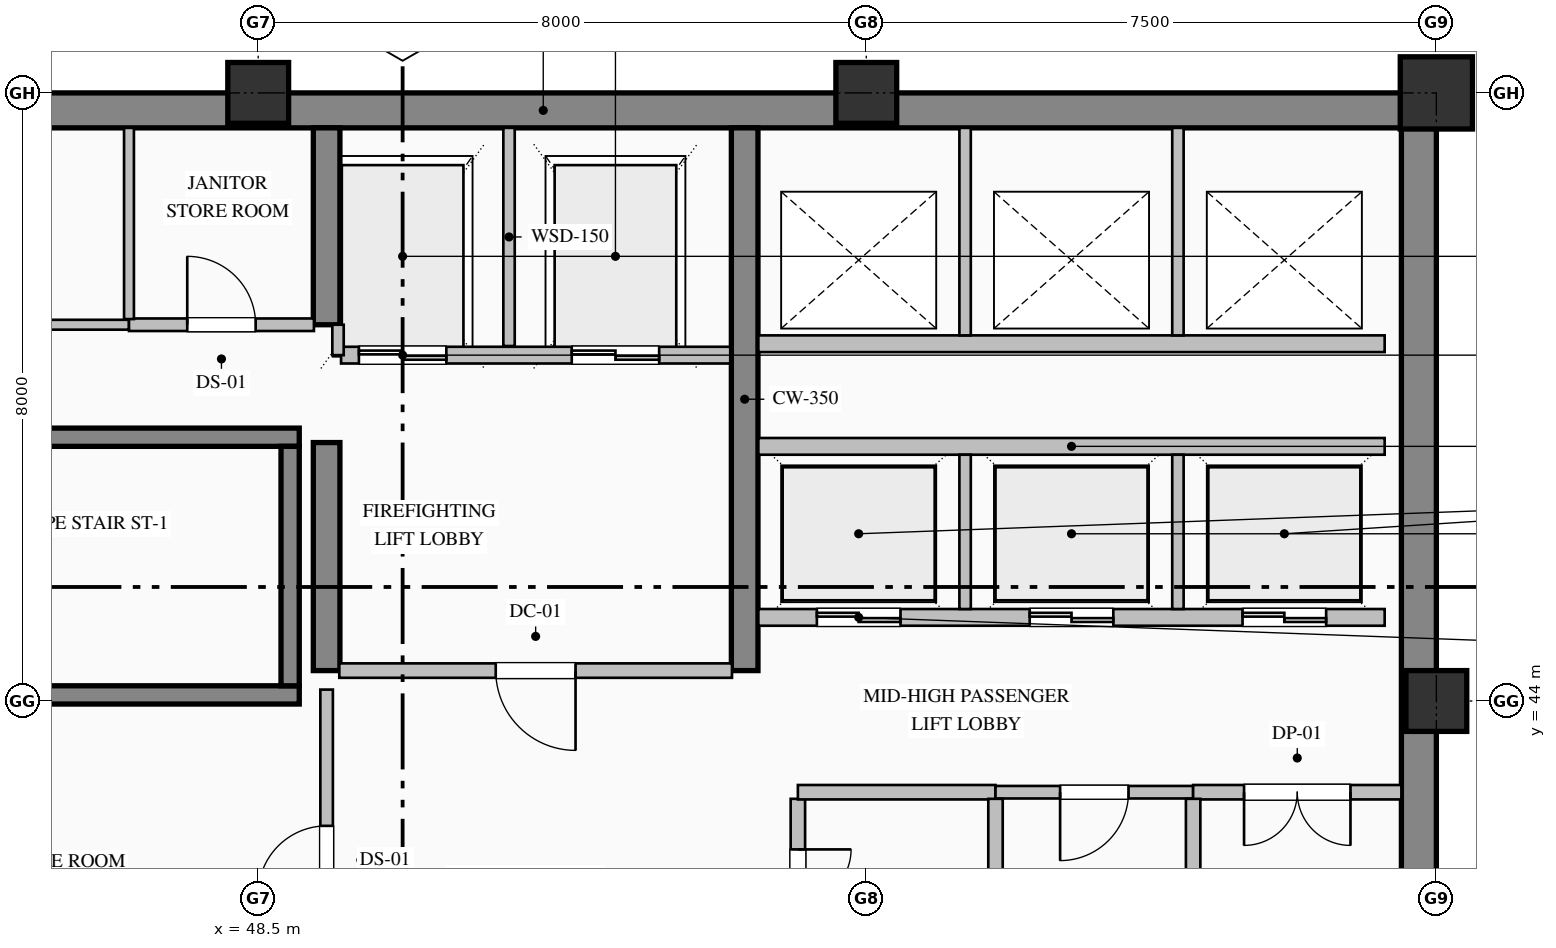
"""IFC4 building model, lengths in metres.
Left out: names, types, materials, properties, quantities, classifications, styles, units other than length and angle.
Written with IfcOpenShell. Run it as: python <this file> out.ifc"""

import sys

from ifc_helpers import new_model, si_unit, direction, frame, frame_2d, origin, origin_2d, place, context, subcontext, project, spatial, rectangle, hollow_rectangle, extrude, element, fill, save


model = new_model("IFC4")
c1 = context("Model", 3, precision=1e-05, world=origin(), true_north=direction((0.0, 1.0)))
c2 = subcontext(c1, "Body", "Model", "MODEL_VIEW")
j1 = project(units=[si_unit("LENGTHUNIT", "METRE"), si_unit("PLANEANGLEUNIT", "RADIAN")], contexts=[c1])
p1 = place(None, origin())
s1 = spatial("IfcSite", under=j1, at=p1, CompositionType="ELEMENT")
p2 = place(p1, origin())
s2 = spatial("IfcBuilding", under=s1, at=p2, CompositionType="ELEMENT")
p3 = place(p2, frame((0.0, 0.0, 257.8)))
s3 = spatial("IfcBuildingStorey", under=s2, at=p3, CompositionType="ELEMENT", Elevation=257.8)
p4 = place(p3, frame((40.5, 51.77, 0.0), z_axis=(0.0, 0.0, 1.0), x_axis=(1.0, 0.0, 0.0)))
e1 = element("IfcWall", 1, at=p4, inside=s3, PredefinedType="SHEAR", context=c2, shape_type="SweptSolid", body=[
    extrude(rectangle(XDim=23.5, YDim=0.46, at=frame_2d((11.75, 0.0))), origin(), (0.0, 0.0, 1.0), 3.775),
])
p5 = place(p3, frame((63.77, 36.32, 0.0), z_axis=(0.0, 0.0, 1.0), x_axis=(0.0, 1.0, 0.0)))
e2 = element("IfcWall", 2, at=p5, inside=s3, PredefinedType="SHEAR", context=c2, shape_type="SweptSolid", body=[
    extrude(rectangle(XDim=15.22, YDim=0.46, at=frame_2d((7.61, 0.0))), origin(), (0.0, 0.0, 1.0), 3.775),
])
p6 = place(p3, frame((49.4, 44.4, 0.0), z_axis=(0.0, 0.0, 1.0), x_axis=(0.0, 1.0, 0.0)))
e3 = element("IfcWall", 3, at=p6, inside=s3, PredefinedType="SHEAR", context=c2, shape_type="SweptSolid", body=[
    extrude(rectangle(XDim=3.0, YDim=0.35, at=frame_2d((1.5, 0.0))), origin(), (0.0, 0.0, 1.0), 3.775),
])
p7 = place(p3, frame((49.4, 48.95, 0.0), z_axis=(0.0, 0.0, 1.0), x_axis=(0.0, 1.0, 0.0)))
e4 = element("IfcWall", 4, at=p7, inside=s3, PredefinedType="SHEAR", context=c2, shape_type="SweptSolid", body=[
    extrude(rectangle(XDim=2.59, YDim=0.35, at=frame_2d((1.295, 0.0))), origin(), (0.0, 0.0, 1.0), 3.775),
])
p8 = place(p3, frame((54.9, 44.4, 0.0), z_axis=(0.0, 0.0, 1.0), x_axis=(0.0, 1.0, 0.0)))
e5 = element("IfcWall", 5, at=p8, inside=s3, PredefinedType="SHEAR", context=c2, shape_type="SweptSolid", body=[
    extrude(rectangle(XDim=7.14, YDim=0.35, at=frame_2d((3.57, 0.0))), origin(), (0.0, 0.0, 1.0), 3.775),
])
for number, where, z_axis, x_axis in (
    (6, (48.5, 52.0, 0.0), (0.0, 0.0, 1.0), (1.0, 0.0, 0.0)),
    (7, (56.5, 52.0, 0.0), (0.0, 0.0, 1.0), (1.0, 0.0, 0.0)),
    (8, (64.0, 44.0, 0.0), (0.0, 0.0, 1.0), (1.0, 0.0, 0.0)),
):
    element("IfcColumn", number, at=place(p3, frame(where, z_axis=z_axis, x_axis=x_axis)), inside=s3, PredefinedType="COLUMN", context=c2, shape_type="SweptSolid", body=[
        extrude(hollow_rectangle(XDim=0.8, YDim=0.8, WallThickness=0.032, at=origin_2d()), origin(), (0.0, 0.0, 1.0), 4.0),
    ])
p9 = place(p3, frame((64.0, 52.0, 0.0), z_axis=(0.0, 0.0, 1.0), x_axis=(1.0, 0.0, 0.0)))
e9 = element("IfcColumn", 9, at=p9, inside=s3, PredefinedType="COLUMN", context=c2, shape_type="SweptSolid", body=[
    extrude(hollow_rectangle(XDim=0.95, YDim=0.95, WallThickness=0.036, at=origin_2d()), origin(), (0.0, 0.0, 1.0), 4.0),
])
for number, where, z_axis, x_axis in (
    (10, (40.96, 47.47, 0.0), (0.0, 0.0, 1.0), (1.0, 0.0, 0.0)),
    (11, (49.04, 44.08, 0.0), (0.0, 0.0, 1.0), (-1.0, 0.0, 0.0)),
):
    element("IfcWall", number, at=place(p3, frame(where, z_axis=z_axis, x_axis=x_axis)), inside=s3, PredefinedType="SOLIDWALL", context=c2, shape_type="SweptSolid", body=[
        extrude(rectangle(XDim=8.08, YDim=0.24, at=frame_2d((4.04, 0.0))), origin(), (0.0, 0.0, 1.0), 4.0),
    ])
p10 = place(p3, frame((48.92, 44.2, 0.0), z_axis=(0.0, 0.0, 1.0), x_axis=(0.0, 1.0, 0.0)))
e12 = element("IfcWall", 12, at=p10, inside=s3, PredefinedType="SOLIDWALL", context=c2, shape_type="SweptSolid", body=[
    extrude(rectangle(XDim=3.15, YDim=0.24, at=frame_2d((1.575, 0.0))), origin(), (0.0, 0.0, 1.0), 4.0),
])
p11 = place(p3, frame((54.71, 48.55, 0.0), z_axis=(0.0, 0.0, 1.0), x_axis=(-1.0, 0.0, 0.0)))
e13 = element("IfcWall", 13, at=p11, inside=s3, PredefinedType="PARTITIONING", context=c2, shape_type="SweptSolid", body=[
    extrude(rectangle(XDim=5.12, YDim=0.22, at=frame_2d((2.56, 0.0))), origin(), (0.0, 0.0, 1.0), 3.775),
])
p12 = place(p11, frame((3.735, 0.0, 0.0)))
e14 = element("IfcOpeningElement", 14, at=p12, cuts=e13, PredefinedType="OPENING", context=c2, shape_type="SweptSolid", body=[
    extrude(rectangle(XDim=1.15, YDim=2.2, at=frame_2d((0.575, 1.1))), frame((0.0, 0.12, 0.0), z_axis=(0.0, -1.0, 0.0), x_axis=(1.0, 0.0, 0.0)), (0.0, 0.0, 1.0), 0.24),
])
p13 = place(p11, frame((0.935, 0.0, 0.0)))
e15 = element("IfcOpeningElement", 15, at=p13, cuts=e13, PredefinedType="OPENING", context=c2, shape_type="SweptSolid", body=[
    extrude(rectangle(XDim=1.15, YDim=2.2, at=frame_2d((0.575, 1.1))), frame((0.0, 0.12, 0.0), z_axis=(0.0, -1.0, 0.0), x_axis=(1.0, 0.0, 0.0)), (0.0, 0.0, 1.0), 0.24),
])
p14 = place(p3, frame((51.8, 48.67, 0.0), z_axis=(0.0, 0.0, 1.0), x_axis=(0.0, 1.0, 0.0)))
e16 = element("IfcWall", 16, at=p14, inside=s3, PredefinedType="PARTITIONING", context=c2, shape_type="SweptSolid", body=[
    extrude(rectangle(XDim=2.87, YDim=0.15, at=frame_2d((1.435, 0.0))), origin(), (0.0, 0.0, 1.0), 3.775),
])
p15 = place(p3, frame((49.55, 48.55, 0.0), z_axis=(0.0, 0.0, 1.0), x_axis=(0.0, 1.0, 0.0)))
e17 = element("IfcWall", 17, at=p15, inside=s3, PredefinedType="PARTITIONING", context=c2, shape_type="SweptSolid", body=[
    extrude(rectangle(XDim=0.4, YDim=0.15, at=frame_2d((0.2, 0.0))), origin(), (0.0, 0.0, 1.0), 3.775),
])
p16 = place(p3, frame((63.32, 45.1, 0.0), z_axis=(0.0, 0.0, 1.0), x_axis=(-1.0, 0.0, 0.0)))
e18 = element("IfcWall", 18, at=p16, inside=s3, PredefinedType="PARTITIONING", context=c2, shape_type="SweptSolid", body=[
    extrude(rectangle(XDim=8.24, YDim=0.22, at=frame_2d((4.12, 0.0))), origin(), (0.0, 0.0, 1.0), 3.775),
])
p17 = place(p16, frame((6.37, 0.0, 0.0)))
e19 = element("IfcOpeningElement", 19, at=p17, cuts=e18, PredefinedType="OPENING", context=c2, shape_type="SweptSolid", body=[
    extrude(rectangle(XDim=1.1, YDim=2.2, at=frame_2d((0.55, 1.1))), frame((0.0, 0.12, 0.0), z_axis=(0.0, -1.0, 0.0), x_axis=(1.0, 0.0, 0.0)), (0.0, 0.0, 1.0), 0.24),
])
p18 = place(p16, frame((3.57, 0.0, 0.0)))
e20 = element("IfcOpeningElement", 20, at=p18, cuts=e18, PredefinedType="OPENING", context=c2, shape_type="SweptSolid", body=[
    extrude(rectangle(XDim=1.1, YDim=2.2, at=frame_2d((0.55, 1.1))), frame((0.0, 0.12, 0.0), z_axis=(0.0, -1.0, 0.0), x_axis=(1.0, 0.0, 0.0)), (0.0, 0.0, 1.0), 0.24),
])
p19 = place(p16, frame((0.77, 0.0, 0.0)))
e21 = element("IfcOpeningElement", 21, at=p19, cuts=e18, PredefinedType="OPENING", context=c2, shape_type="SweptSolid", body=[
    extrude(rectangle(XDim=1.1, YDim=2.2, at=frame_2d((0.55, 1.1))), frame((0.0, 0.12, 0.0), z_axis=(0.0, -1.0, 0.0), x_axis=(1.0, 0.0, 0.0)), (0.0, 0.0, 1.0), 0.24),
])
p20 = place(p3, frame((55.08, 47.35, 0.0), z_axis=(0.0, 0.0, 1.0), x_axis=(1.0, 0.0, 0.0)))
e22 = element("IfcWall", 22, at=p20, inside=s3, PredefinedType="PARTITIONING", context=c2, shape_type="SweptSolid", body=[
    extrude(rectangle(XDim=8.24, YDim=0.22, at=frame_2d((4.12, 0.0))), origin(), (0.0, 0.0, 1.0), 3.775),
])
for number, where, z_axis, x_axis in (
    (23, (57.8, 45.21, 0.0), (0.0, 0.0, 1.0), (0.0, 1.0, 0.0)),
    (24, (60.6, 45.21, 0.0), (0.0, 0.0, 1.0), (0.0, 1.0, 0.0)),
):
    element("IfcWall", number, at=place(p3, frame(where, z_axis=z_axis, x_axis=x_axis)), inside=s3, PredefinedType="PARTITIONING", context=c2, shape_type="SweptSolid", body=[
        extrude(rectangle(XDim=2.03, YDim=0.15, at=frame_2d((1.015, 0.0))), origin(), (0.0, 0.0, 1.0), 3.775),
    ])
p21 = place(p3, frame((63.32, 48.7, 0.0), z_axis=(0.0, 0.0, 1.0), x_axis=(-1.0, 0.0, 0.0)))
e25 = element("IfcWall", 25, at=p21, inside=s3, PredefinedType="PARTITIONING", context=c2, shape_type="SweptSolid", body=[
    extrude(rectangle(XDim=8.24, YDim=0.22, at=frame_2d((4.12, 0.0))), origin(), (0.0, 0.0, 1.0), 3.775),
])
for number, where, z_axis, x_axis in (
    (26, (57.8, 48.81, 0.0), (0.0, 0.0, 1.0), (0.0, 1.0, 0.0)),
    (27, (60.6, 48.81, 0.0), (0.0, 0.0, 1.0), (0.0, 1.0, 0.0)),
):
    element("IfcWall", number, at=place(p3, frame(where, z_axis=z_axis, x_axis=x_axis)), inside=s3, PredefinedType="PARTITIONING", context=c2, shape_type="SweptSolid", body=[
        extrude(rectangle(XDim=2.73, YDim=0.15, at=frame_2d((1.365, 0.0))), origin(), (0.0, 0.0, 1.0), 3.775),
    ])
p22 = place(p3, frame((40.96, 48.95, 0.0), z_axis=(0.0, 0.0, 1.0), x_axis=(1.0, 0.0, 0.0)))
e28 = element("IfcWall", 28, at=p22, inside=s3, PredefinedType="PARTITIONING", context=c2, shape_type="SweptSolid", body=[
    extrude(rectangle(XDim=5.84, YDim=0.13, at=frame_2d((2.92, 0.0))), origin(), (0.0, 0.0, 1.0), 3.775),
])
p23 = place(p22, frame((2.46, 0.0, 0.0)))
e29 = element("IfcOpeningElement", 29, at=p23, cuts=e28, PredefinedType="OPENING", context=c2, shape_type="SweptSolid", body=[
    extrude(rectangle(XDim=0.92, YDim=2.15, at=frame_2d((0.46, 1.075))), frame((0.0, 0.075, 0.0), z_axis=(0.0, -1.0, 0.0), x_axis=(1.0, 0.0, 0.0)), (0.0, 0.0, 1.0), 0.15),
])
p24 = place(p3, frame((46.8, 48.95, 0.0), z_axis=(0.0, 0.0, 1.0), x_axis=(1.0, 0.0, 0.0)))
e30 = element("IfcWall", 30, at=p24, inside=s3, PredefinedType="PARTITIONING", context=c2, shape_type="SweptSolid", body=[
    extrude(rectangle(XDim=2.433, YDim=0.165, at=frame_2d((1.216, 0.0))), origin(), (0.0, 0.0, 1.0), 3.775),
])
p25 = place(p24, frame((0.767, 0.0, 0.0)))
e31 = element("IfcOpeningElement", 31, at=p25, cuts=e30, PredefinedType="OPENING", context=c2, shape_type="SweptSolid", body=[
    extrude(rectangle(XDim=0.9, YDim=2.15, at=frame_2d((0.45, 1.075))), frame((0.0, 0.093, 0.0), z_axis=(0.0, -1.0, 0.0), x_axis=(1.0, 0.0, 0.0)), (0.0, 0.0, 1.0), 0.185),
])
p26 = place(p3, frame((54.733, 44.4, 0.0), z_axis=(0.0, 0.0, 1.0), x_axis=(-1.0, 0.0, 0.0)))
e32 = element("IfcWall", 32, at=p26, inside=s3, PredefinedType="PARTITIONING", context=c2, shape_type="SweptSolid", body=[
    extrude(rectangle(XDim=5.166, YDim=0.19, at=frame_2d((2.583, 0.0))), origin(), (0.0, 0.0, 1.0), 3.775),
])
p27 = place(p26, frame((2.058, 0.0, 0.0)))
e33 = element("IfcOpeningElement", 33, at=p27, cuts=e32, PredefinedType="OPENING", context=c2, shape_type="SweptSolid", body=[
    extrude(rectangle(XDim=1.05, YDim=2.15, at=frame_2d((0.525, 1.075))), frame((0.0, 0.105, 0.0), z_axis=(0.0, -1.0, 0.0), x_axis=(1.0, 0.0, 0.0)), (0.0, 0.0, 1.0), 0.21),
])
p28 = place(p3, frame((49.4, 39.665, 0.0), z_axis=(0.0, 0.0, 1.0), x_axis=(0.0, 1.0, 0.0)))
e34 = element("IfcWall", 34, at=p28, inside=s3, PredefinedType="PARTITIONING", context=c2, shape_type="SweptSolid", body=[
    extrude(rectangle(XDim=4.485, YDim=0.165, at=frame_2d((2.243, 0.0))), origin(), (0.0, 0.0, 1.0), 3.017),
])
p29 = place(p28, frame((1.793, 0.0, 0.0)))
e35 = element("IfcOpeningElement", 35, at=p29, cuts=e34, PredefinedType="OPENING", context=c2, shape_type="SweptSolid", body=[
    extrude(rectangle(XDim=0.9, YDim=2.15, at=frame_2d((0.45, 1.075))), frame((0.0, 0.093, 0.0), z_axis=(0.0, -1.0, 0.0), x_axis=(1.0, 0.0, 0.0)), (0.0, 0.0, 1.0), 0.185),
])
p30 = place(p3, frame((55.6, 42.713, 0.0), z_axis=(0.0, 0.0, 1.0), x_axis=(0.0, -1.0, 0.0)))
e36 = element("IfcWall", 36, at=p30, inside=s3, PredefinedType="PARTITIONING", context=c2, shape_type="SweptSolid", body=[
    extrude(rectangle(XDim=2.731, YDim=0.19, at=frame_2d((1.365, 0.0))), origin(), (0.0, 0.0, 1.0), 3.775),
])
p31 = place(p30, frame((0.666, 0.0, 0.0)))
e37 = element("IfcOpeningElement", 37, at=p31, cuts=e36, PredefinedType="OPENING", context=c2, shape_type="SweptSolid", body=[
    extrude(rectangle(XDim=1.4, YDim=2.25, at=frame_2d((0.7, 1.125))), frame((0.0, 0.105, 0.0), z_axis=(0.0, -1.0, 0.0), x_axis=(1.0, 0.0, 0.0)), (0.0, 0.0, 1.0), 0.21),
])
p32 = place(p3, frame((58.2, 42.8, 0.0), z_axis=(0.0, 0.0, 1.0), x_axis=(-1.0, 0.0, 0.0)))
e38 = element("IfcWall", 38, at=p32, inside=s3, PredefinedType="PARTITIONING", context=c2, shape_type="SweptSolid", body=[
    extrude(rectangle(XDim=2.6, YDim=0.19, at=frame_2d((1.3, 0.0))), origin(), (0.0, 0.0, 1.0), 3.775),
])
p33 = place(p3, frame((60.8, 42.8, 0.0), z_axis=(0.0, 0.0, 1.0), x_axis=(-1.0, 0.0, 0.0)))
e39 = element("IfcWall", 39, at=p33, inside=s3, PredefinedType="PARTITIONING", context=c2, shape_type="SweptSolid", body=[
    extrude(rectangle(XDim=2.6, YDim=0.165, at=frame_2d((1.3, 0.0))), origin(), (0.0, 0.0, 1.0), 3.775),
])
p34 = place(p33, frame((0.85, 0.0, 0.0)))
e40 = element("IfcOpeningElement", 40, at=p34, cuts=e39, PredefinedType="OPENING", context=c2, shape_type="SweptSolid", body=[
    extrude(rectangle(XDim=0.9, YDim=2.15, at=frame_2d((0.45, 1.075))), frame((0.0, 0.093, 0.0), z_axis=(0.0, -1.0, 0.0), x_axis=(1.0, 0.0, 0.0)), (0.0, 0.0, 1.0), 0.185),
])
p35 = place(p3, frame((63.54, 42.8, 0.0), z_axis=(0.0, 0.0, 1.0), x_axis=(-1.0, 0.0, 0.0)))
e41 = element("IfcWall", 41, at=p35, inside=s3, PredefinedType="PARTITIONING", context=c2, shape_type="SweptSolid", body=[
    extrude(rectangle(XDim=2.74, YDim=0.19, at=frame_2d((1.37, 0.0))), origin(), (0.0, 0.0, 1.0), 3.775),
])
p36 = place(p35, frame((0.67, 0.0, 0.0)))
e42 = element("IfcOpeningElement", 42, at=p36, cuts=e41, PredefinedType="OPENING", context=c2, shape_type="SweptSolid", body=[
    extrude(rectangle(XDim=1.4, YDim=2.25, at=frame_2d((0.7, 1.125))), frame((0.0, 0.105, 0.0), z_axis=(0.0, -1.0, 0.0), x_axis=(1.0, 0.0, 0.0)), (0.0, 0.0, 1.0), 0.21),
])
p37 = place(p3, frame((46.8, 51.54, 0.0), z_axis=(0.0, 0.0, 1.0), x_axis=(0.0, -1.0, 0.0)))
e43 = element("IfcWall", 43, at=p37, inside=s3, PredefinedType="PARTITIONING", context=c2, shape_type="SweptSolid", body=[
    extrude(rectangle(XDim=2.516, YDim=0.13, at=frame_2d((1.258, 0.0))), origin(), (0.0, 0.0, 1.0), 3.775),
])
for number, where, z_axis, x_axis in (
    (44, (58.2, 42.713, 0.0), (0.0, 0.0, 1.0), (0.0, -1.0, 0.0)),
    (45, (60.8, 42.713, 0.0), (0.0, 0.0, 1.0), (0.0, -1.0, 0.0)),
):
    element("IfcWall", number, at=place(p3, frame(where, z_axis=z_axis, x_axis=x_axis)), inside=s3, PredefinedType="PARTITIONING", context=c2, shape_type="SweptSolid", body=[
        extrude(rectangle(XDim=2.731, YDim=0.19, at=frame_2d((1.365, 0.0))), origin(), (0.0, 0.0, 1.0), 3.775),
    ])
p38 = place(p12, origin())
e46 = element("IfcDoor", 46, at=p38, inside=s3, OperationType="DOUBLE_DOOR_SLIDING", PredefinedType="DOOR", context=c2, shape_type="SweptSolid", body=[
    extrude(rectangle(XDim=1.15, YDim=2.2, at=frame_2d((0.575, 1.1))), frame((0.0, 0.025, 0.0), z_axis=(0.0, -1.0, 0.0), x_axis=(1.0, 0.0, 0.0)), (0.0, 0.0, 1.0), 0.05),
])
fill(e14, e46)
p39 = place(p13, origin())
e47 = element("IfcDoor", 47, at=p39, inside=s3, OperationType="DOUBLE_DOOR_SLIDING", PredefinedType="DOOR", context=c2, shape_type="SweptSolid", body=[
    extrude(rectangle(XDim=1.15, YDim=2.2, at=frame_2d((0.575, 1.1))), frame((0.0, 0.025, 0.0), z_axis=(0.0, -1.0, 0.0), x_axis=(1.0, 0.0, 0.0)), (0.0, 0.0, 1.0), 0.05),
])
fill(e15, e47)
p40 = place(p17, origin())
e48 = element("IfcDoor", 48, at=p40, inside=s3, OperationType="DOUBLE_DOOR_SLIDING", PredefinedType="DOOR", context=c2, shape_type="SweptSolid", body=[
    extrude(rectangle(XDim=1.1, YDim=2.2, at=frame_2d((0.55, 1.1))), frame((0.0, 0.025, 0.0), z_axis=(0.0, -1.0, 0.0), x_axis=(1.0, 0.0, 0.0)), (0.0, 0.0, 1.0), 0.05),
])
fill(e19, e48)
p41 = place(p18, origin())
e49 = element("IfcDoor", 49, at=p41, inside=s3, OperationType="DOUBLE_DOOR_SLIDING", PredefinedType="DOOR", context=c2, shape_type="SweptSolid", body=[
    extrude(rectangle(XDim=1.1, YDim=2.2, at=frame_2d((0.55, 1.1))), frame((0.0, 0.025, 0.0), z_axis=(0.0, -1.0, 0.0), x_axis=(1.0, 0.0, 0.0)), (0.0, 0.0, 1.0), 0.05),
])
fill(e20, e49)
p42 = place(p19, origin())
e50 = element("IfcDoor", 50, at=p42, inside=s3, OperationType="DOUBLE_DOOR_SLIDING", PredefinedType="DOOR", context=c2, shape_type="SweptSolid", body=[
    extrude(rectangle(XDim=1.1, YDim=2.2, at=frame_2d((0.55, 1.1))), frame((0.0, 0.025, 0.0), z_axis=(0.0, -1.0, 0.0), x_axis=(1.0, 0.0, 0.0)), (0.0, 0.0, 1.0), 0.05),
])
fill(e21, e50)
p43 = place(p27, origin())
e51 = element("IfcDoor", 51, at=p43, inside=s3, OperationType="SINGLE_SWING_LEFT", PredefinedType="DOOR", context=c2, shape_type="SweptSolid", body=[
    extrude(rectangle(XDim=1.05, YDim=2.15, at=frame_2d((0.525, 1.075))), frame((0.0, 0.025, 0.0), z_axis=(0.0, -1.0, 0.0), x_axis=(1.0, 0.0, 0.0)), (0.0, 0.0, 1.0), 0.05),
])
fill(e33, e51)
p44 = place(p29, origin())
e52 = element("IfcDoor", 52, at=p44, inside=s3, OperationType="SINGLE_SWING_LEFT", PredefinedType="DOOR", context=c2, shape_type="SweptSolid", body=[
    extrude(rectangle(XDim=0.9, YDim=2.15, at=frame_2d((0.45, 1.075))), frame((0.0, 0.025, 0.0), z_axis=(0.0, -1.0, 0.0), x_axis=(1.0, 0.0, 0.0)), (0.0, 0.0, 1.0), 0.05),
])
fill(e35, e52)
p45 = place(p25, origin())
e53 = element("IfcDoor", 53, at=p45, inside=s3, OperationType="SINGLE_SWING_LEFT", PredefinedType="DOOR", context=c2, shape_type="SweptSolid", body=[
    extrude(rectangle(XDim=0.9, YDim=2.15, at=frame_2d((0.45, 1.075))), frame((0.0, 0.025, 0.0), z_axis=(0.0, -1.0, 0.0), x_axis=(1.0, 0.0, 0.0)), (0.0, 0.0, 1.0), 0.05),
])
fill(e31, e53)
p46 = place(p31, origin())
e54 = element("IfcDoor", 54, at=p46, inside=s3, OperationType="DOUBLE_DOOR_SINGLE_SWING", PredefinedType="DOOR", context=c2, shape_type="SweptSolid", body=[
    extrude(rectangle(XDim=1.4, YDim=2.25, at=frame_2d((0.7, 1.125))), frame((0.0, 0.025, 0.0), z_axis=(0.0, -1.0, 0.0), x_axis=(1.0, 0.0, 0.0)), (0.0, 0.0, 1.0), 0.05),
])
fill(e37, e54)
p47 = place(p34, origin())
e55 = element("IfcDoor", 55, at=p47, inside=s3, OperationType="SINGLE_SWING_RIGHT", PredefinedType="DOOR", context=c2, shape_type="SweptSolid", body=[
    extrude(rectangle(XDim=0.9, YDim=2.15, at=frame_2d((0.45, 1.075))), frame((0.0, 0.025, 0.0), z_axis=(0.0, -1.0, 0.0), x_axis=(1.0, 0.0, 0.0)), (0.0, 0.0, 1.0), 0.05),
])
fill(e40, e55)
p48 = place(p36, origin())
e56 = element("IfcDoor", 56, at=p48, inside=s3, OperationType="DOUBLE_DOOR_SINGLE_SWING", PredefinedType="DOOR", context=c2, shape_type="SweptSolid", body=[
    extrude(rectangle(XDim=1.4, YDim=2.25, at=frame_2d((0.7, 1.125))), frame((0.0, 0.025, 0.0), z_axis=(0.0, -1.0, 0.0), x_axis=(1.0, 0.0, 0.0)), (0.0, 0.0, 1.0), 0.05),
])
fill(e42, e56)
save(model, sys.argv[1])
